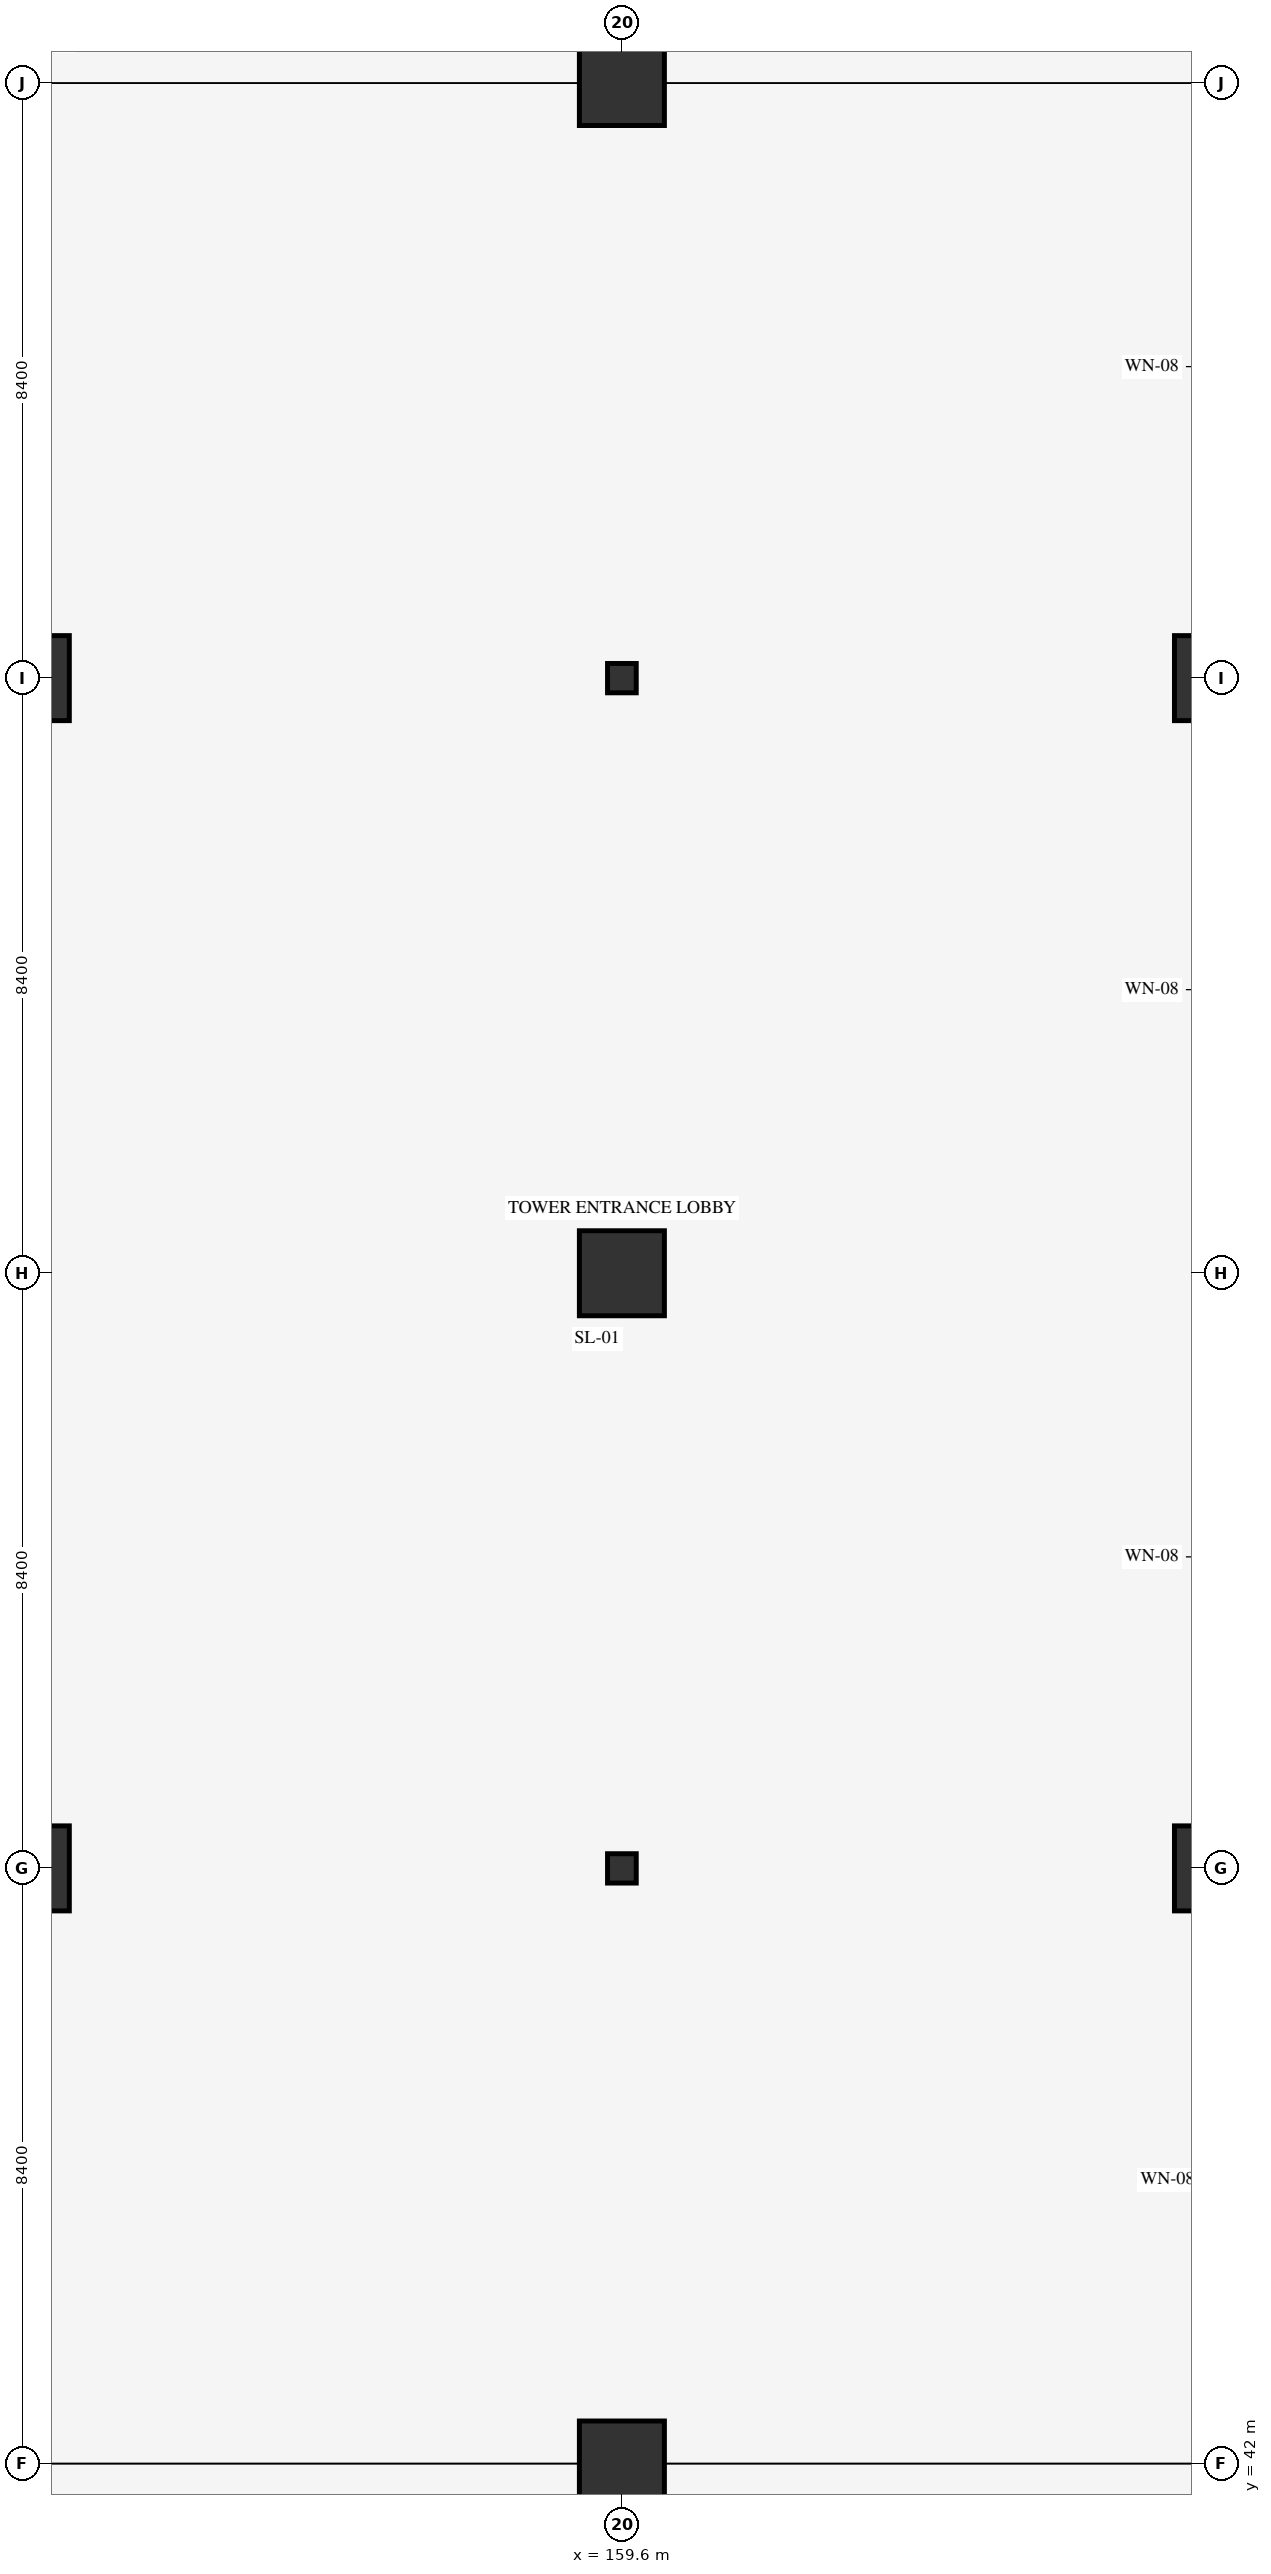
"""IFC4 building model, lengths in metres.
Left out: names, types, materials, properties, quantities, classifications, styles, units other than length and angle.
Written with IfcOpenShell. Run it as: python <this file> out.ifc"""

import sys

from ifc_helpers import new_model, si_unit, direction, frame, origin, origin_2d, place, context, subcontext, project, spatial, rectangle, i_section, extrude, element, save


model = new_model("IFC4")
c1 = context("Model", 3, precision=1e-05, world=origin(), true_north=direction((0.0, 1.0)))
c2 = subcontext(c1, "Body", "Model", "MODEL_VIEW")
j1 = project(units=[si_unit("LENGTHUNIT", "METRE"), si_unit("PLANEANGLEUNIT", "RADIAN")], contexts=[c1])
p1 = place(None, origin())
s1 = spatial("IfcSite", under=j1, at=p1, CompositionType="ELEMENT")
p2 = place(p1, origin())
s2 = spatial("IfcBuilding", under=s1, at=p2, CompositionType="ELEMENT")
p3 = place(p2, origin())
s3 = spatial("IfcBuildingStorey", under=s2, at=p3, CompositionType="ELEMENT", Elevation=0.0)
for number, where, z_axis, x_axis in (
    (1, (151.2, 50.4, 0.0), (0.0, 0.0, 1.0), (1.0, 0.0, 0.0)),
    (2, (151.2, 67.2, 0.0), (0.0, 0.0, 1.0), (1.0, 0.0, 0.0)),
    (3, (159.6, 42.0, 0.0), (0.0, 0.0, 1.0), (1.0, 0.0, 0.0)),
):
    element("IfcColumn", number, at=place(p3, frame(where, z_axis=z_axis, x_axis=x_axis)), inside=s3, PredefinedType="COLUMN", context=c2, shape_type="SweptSolid", body=[
        extrude(rectangle(XDim=1.2, YDim=1.2, at=origin_2d()), origin(), (0.0, 0.0, 1.0), 5.4),
    ])
p4 = place(p3, frame((159.6, 50.4, 0.0), z_axis=(0.0, 0.0, 1.0), x_axis=(1.0, 0.0, 0.0)))
e4 = element("IfcColumn", 4, at=p4, inside=s3, PredefinedType="COLUMN", context=c2, shape_type="SweptSolid", body=[
    extrude(i_section(OverallWidth=0.405, OverallDepth=0.414, WebThickness=0.018, FlangeThickness=0.028, FilletRadius=0.022, at=origin_2d()), origin(), (0.0, 0.0, 1.0), 5.4),
])
p5 = place(p3, frame((159.6, 58.8, 0.0), z_axis=(0.0, 0.0, 1.0), x_axis=(1.0, 0.0, 0.0)))
e5 = element("IfcColumn", 5, at=p5, inside=s3, PredefinedType="COLUMN", context=c2, shape_type="SweptSolid", body=[
    extrude(rectangle(XDim=1.2, YDim=1.2, at=origin_2d()), origin(), (0.0, 0.0, 1.0), 5.4),
])
p6 = place(p3, frame((159.6, 67.2, 0.0), z_axis=(0.0, 0.0, 1.0), x_axis=(1.0, 0.0, 0.0)))
e6 = element("IfcColumn", 6, at=p6, inside=s3, PredefinedType="COLUMN", context=c2, shape_type="SweptSolid", body=[
    extrude(i_section(OverallWidth=0.405, OverallDepth=0.414, WebThickness=0.018, FlangeThickness=0.028, FilletRadius=0.022, at=origin_2d()), origin(), (0.0, 0.0, 1.0), 5.4),
])
for number, where, z_axis, x_axis in (
    (7, (159.6, 75.6, 0.0), (0.0, 0.0, 1.0), (1.0, 0.0, 0.0)),
    (8, (168.0, 50.4, 0.0), (0.0, 0.0, 1.0), (1.0, 0.0, 0.0)),
    (9, (168.0, 67.2, 0.0), (0.0, 0.0, 1.0), (1.0, 0.0, 0.0)),
):
    element("IfcColumn", number, at=place(p3, frame(where, z_axis=z_axis, x_axis=x_axis)), inside=s3, PredefinedType="COLUMN", context=c2, shape_type="SweptSolid", body=[
        extrude(rectangle(XDim=1.2, YDim=1.2, at=origin_2d()), origin(), (0.0, 0.0, 1.0), 5.4),
    ])
save(model, sys.argv[1])
